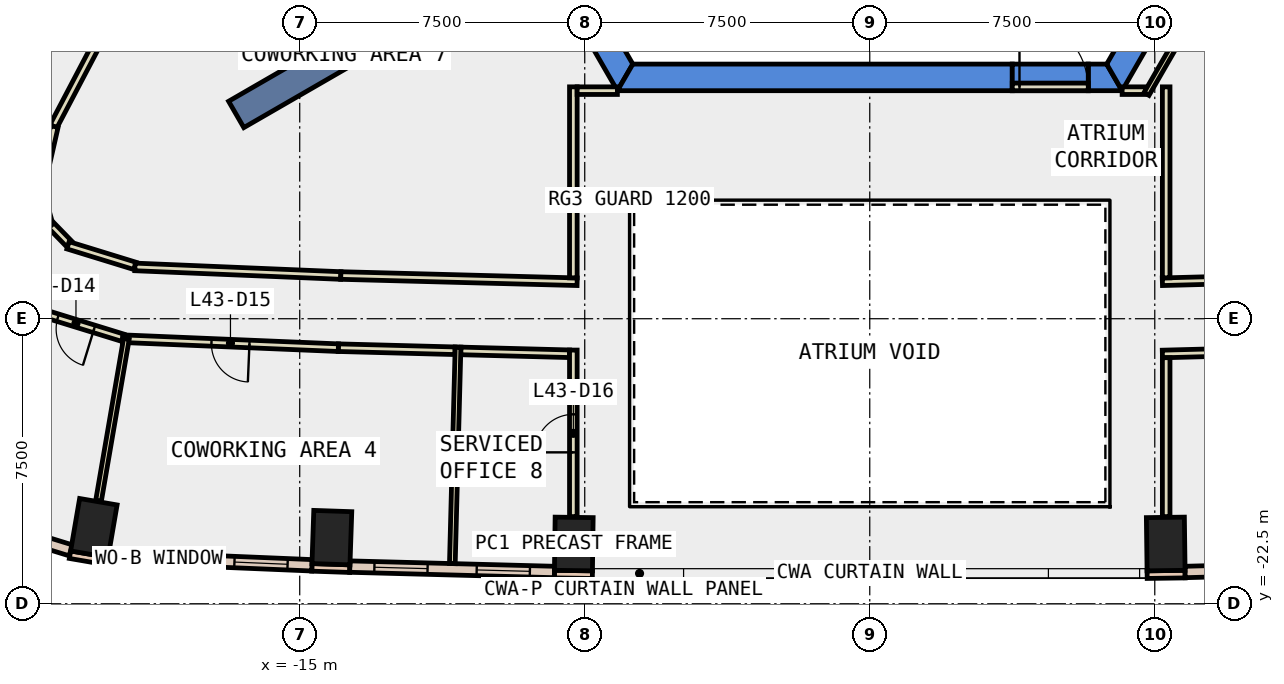
"""IFC4 building model, lengths in metres.
Left out: names, types, materials, properties, quantities, classifications, styles, units other than length and angle.
Written with IfcOpenShell. Run it as: python <this file> out.ifc"""

import sys

from ifc_helpers import new_model, si_unit, direction, frame, frame_2d, origin, origin_2d, place, context, subcontext, project, spatial, polyline, rectangle, outline, extrude, element, fill, save


model = new_model("IFC4")
c1 = context("Model", 3, precision=1e-05, world=origin(), true_north=direction((0.0, 1.0)))
c2 = subcontext(c1, "Body", "Model", "MODEL_VIEW")
j1 = project(units=[si_unit("LENGTHUNIT", "METRE"), si_unit("PLANEANGLEUNIT", "RADIAN")], contexts=[c1])
p1 = place(None, origin())
s1 = spatial("IfcSite", under=j1, at=p1, CompositionType="ELEMENT")
p2 = place(p1, origin())
s2 = spatial("IfcBuilding", under=s1, at=p2, CompositionType="ELEMENT")
p3 = place(p2, frame((0.0, 0.0, 194.0)))
s3 = spatial("IfcBuildingStorey", under=s2, at=p3, CompositionType="ELEMENT", Elevation=194.0)
for number, where, z_axis, x_axis in (
    (1, (-20.417, -20.505, -0.4), (0.0, 0.0, 1.0), (-0.986, 0.169, 0.0)),
    (2, (-14.154, -20.76, -0.4), (0.0, 0.0, 1.0), (-0.999, 0.034, 0.0)),
    (3, (-7.788, -20.927, -0.4), (0.0, 0.0, 1.0), (-1.0, 0.013, 0.0)),
    (4, (7.788, -20.927, -0.4), (0.0, 0.0, 1.0), (1.0, 0.013, 0.0)),
):
    element("IfcColumn", number, at=place(p3, frame(where, z_axis=z_axis, x_axis=x_axis)), inside=s3, PredefinedType="COLUMN", context=c2, shape_type="SweptSolid", body=[
        extrude(rectangle(XDim=1.0, YDim=1.4, at=origin_2d()), origin(), (0.0, 0.0, 1.0), 4.2),
    ])
p4 = place(p3, frame((0.0, 0.0, -0.4)))
e5 = element("IfcWall", 5, at=p4, inside=s3, PredefinedType="SHEAR", context=c2, shape_type="SweptSolid", body=[
    extrude(outline(polyline([(-13.279, 2.5), (-6.64, -9.0), (-6.235, -8.3), (-12.471, 2.5), (-13.279, 2.5)])), origin(), (0.0, 0.0, 1.0), 4.2),
])
p5 = place(p3, frame((0.0, 0.0, -0.4)))
e6 = element("IfcWall", 6, at=p5, inside=s3, PredefinedType="SHEAR", context=c2, shape_type="SweptSolid", body=[
    extrude(outline(polyline([(3.75, -9.0), (3.75, -8.3), (-6.235, -8.3), (-6.64, -9.0), (3.75, -9.0)])), origin(), (0.0, 0.0, 1.0), 4.2),
])
p6 = place(p3, frame((0.0, 0.0, -0.4)))
e7 = element("IfcWall", 7, at=p6, inside=s3, PredefinedType="SHEAR", context=c2, shape_type="SweptSolid", body=[
    extrude(outline(polyline([(5.75, -8.3), (5.75, -9.0), (6.64, -9.0), (6.235, -8.3), (5.75, -8.3)])), origin(), (0.0, 0.0, 1.0), 4.2),
])
p7 = place(p3, frame((0.0, 0.0, 3.6)))
e8 = element("IfcWall", 8, at=p7, inside=s3, PredefinedType="SHEAR", context=c2, shape_type="SweptSolid", body=[
    extrude(outline(polyline([(5.75, -9.0), (5.75, -8.3), (3.75, -8.3), (3.75, -9.0), (5.75, -9.0)])), origin(), (0.0, 0.0, 1.0), 0.2),
])
p8 = place(p3, frame((0.0, 0.0, -0.4)))
e9 = element("IfcWall", 9, at=p8, inside=s3, PredefinedType="SHEAR", context=c2, shape_type="SweptSolid", body=[
    extrude(outline(polyline([(6.64, -9.0), (13.279, 2.5), (12.471, 2.5), (6.235, -8.3), (6.64, -9.0)])), origin(), (0.0, 0.0, 1.0), 4.2),
])
for number, where, z_axis, x_axis in (
    (10, (8.877, -5.125, -0.4), (0.0, 0.0, 1.0), (0.866, -0.5, 0.0)),
    (11, (-8.877, -5.125, -0.4), (0.0, 0.0, 1.0), (-0.866, -0.5, 0.0)),
):
    element("IfcWall", number, at=place(p3, frame(where, z_axis=z_axis, x_axis=x_axis)), inside=s3, PredefinedType="SHEAR", context=c2, shape_type="SweptSolid", body=[
        extrude(rectangle(XDim=9.0, YDim=0.8, at=frame_2d((4.5, 0.0))), origin(), (0.0, 0.0, 1.0), 4.2),
    ])
p9 = place(p3, frame((-21.045, -21.209, 0.0), z_axis=(0.0, 0.0, 1.0), x_axis=(0.985631544579, -0.168909615862, 0.0)))
e12 = element("IfcWall", 12, at=p9, inside=s3, PredefinedType="STANDARD", context=c2, shape_type="SweptSolid", body=[
    extrude(rectangle(XDim=1.0, YDim=0.2, at=frame_2d((0.5, 0.0))), origin(), (0.0, 0.0, 1.0), 3.8),
])
p10 = place(p3, frame((-14.681, -21.542, 0.0), z_axis=(0.0, 0.0, 1.0), x_axis=(0.999423561854, -0.033949138587, 0.0)))
e13 = element("IfcWall", 13, at=p10, inside=s3, PredefinedType="STANDARD", context=c2, shape_type="SweptSolid", body=[
    extrude(rectangle(XDim=1.0, YDim=0.2, at=frame_2d((0.5, 0.0))), origin(), (0.0, 0.0, 1.0), 3.8),
])
for number, where, z_axis, x_axis in (
    (14, (-8.299, -21.72, 0.0), (0.0, 0.0, 1.0), (1.0, -0.014, 0.0)),
    (15, (7.299, -21.734, 0.0), (0.0, 0.0, 1.0), (1.0, 0.014, 0.0)),
):
    element("IfcWall", number, at=place(p3, frame(where, z_axis=z_axis, x_axis=x_axis)), inside=s3, PredefinedType="STANDARD", context=c2, shape_type="SweptSolid", body=[
        extrude(rectangle(XDim=1.0, YDim=0.2, at=frame_2d((0.5, 0.0))), origin(), (0.0, 0.0, 1.0), 3.8),
    ])
p11 = place(p3, frame((-20.041, -21.264, 0.0), z_axis=(0.0, 0.0, 1.0), x_axis=(0.999127941775, -0.041753514387, 0.0)))
e16 = element("IfcWall", 16, at=p11, inside=s3, PredefinedType="STANDARD", context=c2, shape_type="SweptSolid", body=[
    extrude(rectangle(XDim=5.368, YDim=0.3, at=frame_2d((2.684, 0.0))), origin(), (0.0, 0.0, 1.0), 3.8),
])
p12 = place(p11, frame((0.642, 0.0, 0.9)))
e17 = element("IfcOpeningElement", 17, at=p12, cuts=e16, PredefinedType="OPENING", context=c2, shape_type="SweptSolid", body=[
    extrude(rectangle(XDim=1.4, YDim=2.6, at=frame_2d((0.7, 1.3))), frame((0.0, 0.16, 0.0), z_axis=(0.0, -1.0, 0.0), x_axis=(1.0, 0.0, 0.0)), (0.0, 0.0, 1.0), 0.32),
])
p13 = place(p11, frame((3.326, 0.0, 0.9)))
e18 = element("IfcOpeningElement", 18, at=p13, cuts=e16, PredefinedType="OPENING", context=c2, shape_type="SweptSolid", body=[
    extrude(rectangle(XDim=1.4, YDim=2.6, at=frame_2d((0.7, 1.3))), frame((0.0, 0.16, 0.0), z_axis=(0.0, -1.0, 0.0), x_axis=(1.0, 0.0, 0.0)), (0.0, 0.0, 1.0), 0.32),
])
p14 = place(p3, frame((-13.681, -21.522, 0.0), z_axis=(0.0, 0.0, 1.0), x_axis=(0.999651908676, -0.026382977093, 0.0)))
e19 = element("IfcWall", 19, at=p14, inside=s3, PredefinedType="STANDARD", context=c2, shape_type="SweptSolid", body=[
    extrude(rectangle(XDim=5.386, YDim=0.3, at=frame_2d((2.693, 0.0))), origin(), (0.0, 0.0, 1.0), 3.8),
])
p15 = place(p14, frame((0.646, 0.0, 0.9)))
e20 = element("IfcOpeningElement", 20, at=p15, cuts=e19, PredefinedType="OPENING", context=c2, shape_type="SweptSolid", body=[
    extrude(rectangle(XDim=1.4, YDim=2.6, at=frame_2d((0.7, 1.3))), frame((0.0, 0.16, 0.0), z_axis=(0.0, -1.0, 0.0), x_axis=(1.0, 0.0, 0.0)), (0.0, 0.0, 1.0), 0.32),
])
p16 = place(p14, frame((3.339, 0.0, 0.9)))
e21 = element("IfcOpeningElement", 21, at=p16, cuts=e19, PredefinedType="OPENING", context=c2, shape_type="SweptSolid", body=[
    extrude(rectangle(XDim=1.4, YDim=2.6, at=frame_2d((0.7, 1.3))), frame((0.0, 0.16, 0.0), z_axis=(0.0, -1.0, 0.0), x_axis=(1.0, 0.0, 0.0)), (0.0, 0.0, 1.0), 0.32),
])
p17 = place(p3, frame((8.297, -21.664, 0.0), z_axis=(0.0, 0.0, 1.0), x_axis=(0.999651908676, 0.026382977093, 0.0)))
e22 = element("IfcWall", 22, at=p17, inside=s3, PredefinedType="STANDARD", context=c2, shape_type="SweptSolid", body=[
    extrude(rectangle(XDim=5.386, YDim=0.3, at=frame_2d((2.693, 0.0))), origin(), (0.0, 0.0, 1.0), 3.8),
])
p18 = place(p17, frame((0.646, 0.0, 0.9)))
e23 = element("IfcOpeningElement", 23, at=p18, cuts=e22, PredefinedType="OPENING", context=c2, shape_type="SweptSolid", body=[
    extrude(rectangle(XDim=1.4, YDim=2.6, at=frame_2d((0.7, 1.3))), frame((0.0, 0.16, 0.0), z_axis=(0.0, -1.0, 0.0), x_axis=(1.0, 0.0, 0.0)), (0.0, 0.0, 1.0), 0.32),
])
p19 = place(p17, frame((3.339, 0.0, 0.9)))
e24 = element("IfcOpeningElement", 24, at=p19, cuts=e22, PredefinedType="OPENING", context=c2, shape_type="SweptSolid", body=[
    extrude(rectangle(XDim=1.4, YDim=2.6, at=frame_2d((0.7, 1.3))), frame((0.0, 0.16, 0.0), z_axis=(0.0, -1.0, 0.0), x_axis=(1.0, 0.0, 0.0)), (0.0, 0.0, 1.0), 0.32),
])
p20 = place(p3, frame((-24.624, -19.986, 0.0), z_axis=(0.0, 0.0, 1.0), x_axis=(0.955692086233, -0.29436819854, 0.0)))
e25 = element("IfcWall", 25, at=p20, inside=s3, PredefinedType="STANDARD", context=c2, shape_type="SweptSolid", body=[
    extrude(rectangle(XDim=3.767, YDim=0.3, at=frame_2d((1.884, 0.0))), origin(), (0.0, 0.0, 1.0), 3.8),
])
p21 = place(p20, frame((1.183, 0.0, 0.9)))
e26 = element("IfcOpeningElement", 26, at=p21, cuts=e25, PredefinedType="OPENING", context=c2, shape_type="SweptSolid", body=[
    extrude(rectangle(XDim=1.4, YDim=2.6, at=frame_2d((0.7, 1.3))), frame((0.0, 0.16, 0.0), z_axis=(0.0, -1.0, 0.0), x_axis=(1.0, 0.0, 0.0)), (0.0, 0.0, 1.0), 0.32),
])
p22 = place(p3, frame((7.7, -14.027, 0.0), z_axis=(0.0, 0.0, 1.0), x_axis=(0.999653919353, 0.026306682088, 0.0)))
e27 = element("IfcWall", 27, at=p22, inside=s3, PredefinedType="PARTITIONING", context=c2, shape_type="SweptSolid", body=[
    extrude(rectangle(XDim=6.162, YDim=0.2, at=frame_2d((3.081, 0.0))), origin(), (0.0, 0.0, 1.0), 3.8),
])
p23 = place(p22, frame((2.581, 0.0, 0.0)))
e28 = element("IfcOpeningElement", 28, at=p23, cuts=e27, PredefinedType="OPENING", context=c2, shape_type="SweptSolid", body=[
    extrude(rectangle(XDim=1.0, YDim=2.1, at=frame_2d((0.5, 1.05))), frame((0.0, 0.11, 0.0), z_axis=(0.0, -1.0, 0.0), x_axis=(1.0, 0.0, 0.0)), (0.0, 0.0, 1.0), 0.22),
])
p24 = place(p3, frame((-18.112, -3.531, 0.0), z_axis=(0.0, 0.0, 1.0), x_axis=(-0.465461327558, -0.885068219149, 0.0)))
e29 = element("IfcWall", 29, at=p24, inside=s3, PredefinedType="PARTITIONING", context=c2, shape_type="SweptSolid", body=[
    extrude(rectangle(XDim=7.236, YDim=0.2, at=frame_2d((3.618, 0.0))), origin(), (0.0, 0.0, 1.0), 3.8),
])
p25 = place(p3, frame((-21.456, -9.944, 0.0), z_axis=(0.0, 0.0, 1.0), x_axis=(-0.222871656966, -0.974847795567, 0.0)))
e30 = element("IfcWall", 30, at=p25, inside=s3, PredefinedType="PARTITIONING", context=c2, shape_type="SweptSolid", body=[
    extrude(rectangle(XDim=1.839, YDim=0.2, at=frame_2d((0.919, 0.0))), origin(), (0.0, 0.0, 1.0), 3.8),
])
p26 = place(p3, frame((-21.816, -11.735, 0.0), z_axis=(0.0, 0.0, 1.0), x_axis=(0.270192443589, -0.962806337447, 0.0)))
e31 = element("IfcWall", 31, at=p26, inside=s3, PredefinedType="PARTITIONING", context=c2, shape_type="SweptSolid", body=[
    extrude(rectangle(XDim=0.869, YDim=0.2, at=frame_2d((0.435, 0.0))), origin(), (0.0, 0.0, 1.0), 3.8),
])
p27 = place(p3, frame((-21.538, -12.547, 0.0), z_axis=(0.0, 0.0, 1.0), x_axis=(0.697542638825, -0.716543276446, 0.0)))
e32 = element("IfcWall", 32, at=p27, inside=s3, PredefinedType="PARTITIONING", context=c2, shape_type="SweptSolid", body=[
    extrude(rectangle(XDim=0.668, YDim=0.2, at=frame_2d((0.334, 0.0))), origin(), (0.0, 0.0, 1.0), 3.8),
])
p28 = place(p3, frame((-21.097, -13.068, 0.0), z_axis=(0.0, 0.0, 1.0), x_axis=(0.955790442908, -0.294048685161, 0.0)))
e33 = element("IfcWall", 33, at=p28, inside=s3, PredefinedType="PARTITIONING", context=c2, shape_type="SweptSolid", body=[
    extrude(rectangle(XDim=1.846, YDim=0.2, at=frame_2d((0.923, 0.0))), origin(), (0.0, 0.0, 1.0), 3.8),
])
p29 = place(p3, frame((-19.336, -13.637, 0.0), z_axis=(0.0, 0.0, 1.0), x_axis=(0.999130261307, -0.041697972867, 0.0)))
e34 = element("IfcWall", 34, at=p29, inside=s3, PredefinedType="PARTITIONING", context=c2, shape_type="SweptSolid", body=[
    extrude(rectangle(XDim=5.422, YDim=0.2, at=frame_2d((2.711, 0.0))), origin(), (0.0, 0.0, 1.0), 3.8),
])
p30 = place(p3, frame((-13.919, -13.863, 0.0), z_axis=(0.0, 0.0, 1.0), x_axis=(0.999652206272, -0.026371698764, 0.0)))
e35 = element("IfcWall", 35, at=p30, inside=s3, PredefinedType="PARTITIONING", context=c2, shape_type="SweptSolid", body=[
    extrude(rectangle(XDim=6.221, YDim=0.2, at=frame_2d((3.111, 0.0))), origin(), (0.0, 0.0, 1.0), 3.8),
])
p31 = place(p3, frame((14.059, -15.76, 0.0), z_axis=(0.0, 0.0, 1.0), x_axis=(-0.999651338269, -0.026404580978, 0.0)))
e36 = element("IfcWall", 36, at=p31, inside=s3, PredefinedType="PARTITIONING", context=c2, shape_type="SweptSolid", body=[
    extrude(rectangle(XDim=6.361, YDim=0.2, at=frame_2d((3.181, 0.0))), origin(), (0.0, 0.0, 1.0), 3.8),
])
p32 = place(p31, frame((2.681, 0.0, 0.0)))
e37 = element("IfcOpeningElement", 37, at=p32, cuts=e36, PredefinedType="OPENING", context=c2, shape_type="SweptSolid", body=[
    extrude(rectangle(XDim=1.0, YDim=2.1, at=frame_2d((0.5, 1.05))), frame((0.0, 0.11, 0.0), z_axis=(0.0, -1.0, 0.0), x_axis=(1.0, 0.0, 0.0)), (0.0, 0.0, 1.0), 0.22),
])
p33 = place(p3, frame((-19.657, -15.5, 0.0), z_axis=(0.0, 0.0, 1.0), x_axis=(-0.955612889251, 0.294625195625, 0.0)))
e38 = element("IfcWall", 38, at=p33, inside=s3, PredefinedType="PARTITIONING", context=c2, shape_type="SweptSolid", body=[
    extrude(rectangle(XDim=2.576, YDim=0.2, at=frame_2d((1.288, 0.0))), origin(), (0.0, 0.0, 1.0), 3.8),
])
p34 = place(p33, frame((0.788, 0.0, 0.0)))
e39 = element("IfcOpeningElement", 39, at=p34, cuts=e38, PredefinedType="OPENING", context=c2, shape_type="SweptSolid", body=[
    extrude(rectangle(XDim=1.0, YDim=2.1, at=frame_2d((0.5, 1.05))), frame((0.0, 0.11, 0.0), z_axis=(0.0, -1.0, 0.0), x_axis=(1.0, 0.0, 0.0)), (0.0, 0.0, 1.0), 0.22),
])
p35 = place(p3, frame((-10.912, -15.843, 0.0), z_axis=(0.0, 0.0, 1.0), x_axis=(-0.999652047394, 0.026377720532, 0.0)))
e40 = element("IfcWall", 40, at=p35, inside=s3, PredefinedType="PARTITIONING", context=c2, shape_type="SweptSolid", body=[
    extrude(rectangle(XDim=3.073, YDim=0.2, at=frame_2d((1.536, 0.0))), origin(), (0.0, 0.0, 1.0), 3.8),
])
p36 = place(p3, frame((-13.984, -15.762, 0.0), z_axis=(0.0, 0.0, 1.0), x_axis=(-0.999129271091, 0.041721692781, 0.0)))
e41 = element("IfcWall", 41, at=p36, inside=s3, PredefinedType="PARTITIONING", context=c2, shape_type="SweptSolid", body=[
    extrude(rectangle(XDim=5.682, YDim=0.2, at=frame_2d((2.841, 0.0))), origin(), (0.0, 0.0, 1.0), 3.8),
])
p37 = place(p36, frame((2.341, 0.0, 0.0)))
e42 = element("IfcOpeningElement", 42, at=p37, cuts=e41, PredefinedType="OPENING", context=c2, shape_type="SweptSolid", body=[
    extrude(rectangle(XDim=1.0, YDim=2.1, at=frame_2d((0.5, 1.05))), frame((0.0, 0.11, 0.0), z_axis=(0.0, -1.0, 0.0), x_axis=(1.0, 0.0, 0.0)), (0.0, 0.0, 1.0), 0.22),
])
p38 = place(p3, frame((-7.9, -15.922, 0.0), z_axis=(0.0, 0.0, 1.0), x_axis=(-0.999655039681, 0.026264075085, 0.0)))
e43 = element("IfcWall", 43, at=p38, inside=s3, PredefinedType="PARTITIONING", context=c2, shape_type="SweptSolid", body=[
    extrude(rectangle(XDim=2.863, YDim=0.2, at=frame_2d((1.432, 0.0))), origin(), (0.0, 0.0, 1.0), 3.8),
])
p39 = place(p3, frame((6.641, -8.999, 0.0), z_axis=(0.0, 0.0, 1.0), x_axis=(1.0, 0.0, 0.0)))
e44 = element("IfcWall", 44, at=p39, inside=s3, PredefinedType="PARTITIONING", context=c2, shape_type="SweptSolid", body=[
    extrude(rectangle(XDim=0.617, YDim=0.2, at=frame_2d((0.309, 0.0))), origin(), (0.0, 0.0, 1.0), 3.8),
])
p40 = place(p3, frame((7.283, -9.086, 0.0), z_axis=(0.0, 0.0, 1.0), x_axis=(0.499843936326, 0.866115488442, 0.0)))
e45 = element("IfcWall", 45, at=p40, inside=s3, PredefinedType="PARTITIONING", context=c2, shape_type="SweptSolid", body=[
    extrude(rectangle(XDim=3.827, YDim=0.15, at=frame_2d((1.914, 0.0))), origin(), (0.0, 0.0, 1.0), 3.8),
])
for number, where, z_axis, x_axis in (
    (46, (7.8, -8.899, 0.0), (0.0, 0.0, 1.0), (0.0, -1.0, 0.0)),
    (47, (-7.8, -13.924, 0.0), (0.0, 0.0, 1.0), (0.0, 1.0, 0.0)),
):
    element("IfcWall", number, at=place(p3, frame(where, z_axis=z_axis, x_axis=x_axis)), inside=s3, PredefinedType="PARTITIONING", context=c2, shape_type="SweptSolid", body=[
        extrude(rectangle(XDim=5.025, YDim=0.2, at=frame_2d((2.513, 0.0))), origin(), (0.0, 0.0, 1.0), 3.8),
    ])
p41 = place(p3, frame((-7.7, -8.999, 0.0), z_axis=(0.0, 0.0, 1.0), x_axis=(1.0, 0.0, 0.0)))
e48 = element("IfcWall", 48, at=p41, inside=s3, PredefinedType="PARTITIONING", context=c2, shape_type="SweptSolid", body=[
    extrude(rectangle(XDim=1.059, YDim=0.2, at=frame_2d((0.529, 0.0))), origin(), (0.0, 0.0, 1.0), 3.8),
])
p42 = place(p3, frame((7.8, -16.025, 0.0), z_axis=(0.0, 0.0, 1.0), x_axis=(0.0, -1.0, 0.0)))
e49 = element("IfcWall", 49, at=p42, inside=s3, PredefinedType="PARTITIONING", context=c2, shape_type="SweptSolid", body=[
    extrude(rectangle(XDim=4.182, YDim=0.2, at=frame_2d((2.091, 0.0))), origin(), (0.0, 0.0, 1.0), 3.8),
])
p43 = place(p3, frame((-7.8, -20.207, 0.0), z_axis=(0.0, 0.0, 1.0), x_axis=(0.0, 1.0, 0.0)))
e50 = element("IfcWall", 50, at=p43, inside=s3, PredefinedType="PARTITIONING", context=c2, shape_type="SweptSolid", body=[
    extrude(rectangle(XDim=4.382, YDim=0.2, at=frame_2d((2.191, 0.0))), origin(), (0.0, 0.0, 1.0), 3.8),
])
p44 = place(p43, frame((1.691, 0.0, 0.0)))
e51 = element("IfcOpeningElement", 51, at=p44, cuts=e50, PredefinedType="OPENING", context=c2, shape_type="SweptSolid", body=[
    extrude(rectangle(XDim=1.0, YDim=2.1, at=frame_2d((0.5, 1.05))), frame((0.0, 0.11, 0.0), z_axis=(0.0, -1.0, 0.0), x_axis=(1.0, 0.0, 0.0)), (0.0, 0.0, 1.0), 0.22),
])
p45 = place(p3, frame((-19.561, -15.529, 0.0), z_axis=(0.0, 0.0, 1.0), x_axis=(-0.169546150064, -0.98552224886, 0.0)))
e52 = element("IfcWall", 52, at=p45, inside=s3, PredefinedType="PARTITIONING", context=c2, shape_type="SweptSolid", body=[
    extrude(rectangle(XDim=4.329, YDim=0.15, at=frame_2d((2.164, 0.0))), origin(), (0.0, 0.0, 1.0), 3.8),
])
p46 = place(p3, frame((-10.834, -15.745, 0.0), z_axis=(0.0, 0.0, 1.0), x_axis=(-0.026298797458, -0.999654126812, 0.0)))
e53 = element("IfcWall", 53, at=p46, inside=s3, PredefinedType="PARTITIONING", context=c2, shape_type="SweptSolid", body=[
    extrude(rectangle(XDim=5.7, YDim=0.15, at=frame_2d((2.85, 0.0))), origin(), (0.0, 0.0, 1.0), 3.8),
])
p47 = place(p3, frame((3.75, -8.9, 0.0), z_axis=(0.0, 0.0, 1.0), x_axis=(1.0, 0.0, 0.0)))
e54 = element("IfcWall", 54, at=p47, inside=s3, PredefinedType="PARTITIONING", context=c2, shape_type="SweptSolid", body=[
    extrude(rectangle(XDim=2.0, YDim=0.2, at=frame_2d((1.0, 0.0))), origin(), (0.0, 0.0, 1.0), 2.4),
])
p48 = place(p47, frame((0.19, 0.0, 0.0)))
e55 = element("IfcOpeningElement", 55, at=p48, cuts=e54, PredefinedType="OPENING", context=c2, shape_type="SweptSolid", body=[
    extrude(rectangle(XDim=1.8, YDim=2.1, at=frame_2d((0.9, 1.05))), frame((0.0, 0.11, 0.0), z_axis=(0.0, -1.0, 0.0), x_axis=(1.0, 0.0, 0.0)), (0.0, 0.0, 1.0), 0.22),
])
p49 = place(p12, origin())
e56 = element("IfcWindow", 56, at=p49, inside=s3, PartitioningType="SINGLE_PANEL", PredefinedType="WINDOW", context=c2, shape_type="SweptSolid", body=[
    extrude(rectangle(XDim=1.4, YDim=2.6, at=frame_2d((0.7, 1.3))), frame((0.0, 0.03, 0.0), z_axis=(0.0, -1.0, 0.0), x_axis=(1.0, 0.0, 0.0)), (0.0, 0.0, 1.0), 0.06),
])
fill(e17, e56)
p50 = place(p13, origin())
e57 = element("IfcWindow", 57, at=p50, inside=s3, PartitioningType="SINGLE_PANEL", PredefinedType="WINDOW", context=c2, shape_type="SweptSolid", body=[
    extrude(rectangle(XDim=1.4, YDim=2.6, at=frame_2d((0.7, 1.3))), frame((0.0, 0.03, 0.0), z_axis=(0.0, -1.0, 0.0), x_axis=(1.0, 0.0, 0.0)), (0.0, 0.0, 1.0), 0.06),
])
fill(e18, e57)
p51 = place(p15, origin())
e58 = element("IfcWindow", 58, at=p51, inside=s3, PartitioningType="SINGLE_PANEL", PredefinedType="WINDOW", context=c2, shape_type="SweptSolid", body=[
    extrude(rectangle(XDim=1.4, YDim=2.6, at=frame_2d((0.7, 1.3))), frame((0.0, 0.03, 0.0), z_axis=(0.0, -1.0, 0.0), x_axis=(1.0, 0.0, 0.0)), (0.0, 0.0, 1.0), 0.06),
])
fill(e20, e58)
p52 = place(p16, origin())
e59 = element("IfcWindow", 59, at=p52, inside=s3, PartitioningType="SINGLE_PANEL", PredefinedType="WINDOW", context=c2, shape_type="SweptSolid", body=[
    extrude(rectangle(XDim=1.4, YDim=2.6, at=frame_2d((0.7, 1.3))), frame((0.0, 0.03, 0.0), z_axis=(0.0, -1.0, 0.0), x_axis=(1.0, 0.0, 0.0)), (0.0, 0.0, 1.0), 0.06),
])
fill(e21, e59)
p53 = place(p34, origin())
e60 = element("IfcDoor", 60, at=p53, inside=s3, OperationType="SINGLE_SWING_LEFT", PredefinedType="DOOR", context=c2, shape_type="SweptSolid", body=[
    extrude(rectangle(XDim=1.0, YDim=2.1, at=frame_2d((0.5, 1.05))), frame((0.0, 0.025, 0.0), z_axis=(0.0, -1.0, 0.0), x_axis=(1.0, 0.0, 0.0)), (0.0, 0.0, 1.0), 0.05),
])
fill(e39, e60)
p54 = place(p37, origin())
e61 = element("IfcDoor", 61, at=p54, inside=s3, OperationType="SINGLE_SWING_LEFT", PredefinedType="DOOR", context=c2, shape_type="SweptSolid", body=[
    extrude(rectangle(XDim=1.0, YDim=2.1, at=frame_2d((0.5, 1.05))), frame((0.0, 0.025, 0.0), z_axis=(0.0, -1.0, 0.0), x_axis=(1.0, 0.0, 0.0)), (0.0, 0.0, 1.0), 0.05),
])
fill(e42, e61)
p55 = place(p44, origin())
e62 = element("IfcDoor", 62, at=p55, inside=s3, OperationType="SINGLE_SWING_LEFT", PredefinedType="DOOR", context=c2, shape_type="SweptSolid", body=[
    extrude(rectangle(XDim=1.0, YDim=2.1, at=frame_2d((0.5, 1.05))), frame((0.0, 0.025, 0.0), z_axis=(0.0, -1.0, 0.0), x_axis=(1.0, 0.0, 0.0)), (0.0, 0.0, 1.0), 0.05),
])
fill(e51, e62)
p56 = place(p48, origin())
e63 = element("IfcDoor", 63, at=p56, inside=s3, OperationType="DOUBLE_DOOR_SINGLE_SWING", PredefinedType="DOOR", context=c2, shape_type="SweptSolid", body=[
    extrude(rectangle(XDim=1.8, YDim=2.1, at=frame_2d((0.9, 1.05))), frame((0.0, 0.025, 0.0), z_axis=(0.0, -1.0, 0.0), x_axis=(1.0, 0.0, 0.0)), (0.0, 0.0, 1.0), 0.05),
])
fill(e55, e63)
save(model, sys.argv[1])
